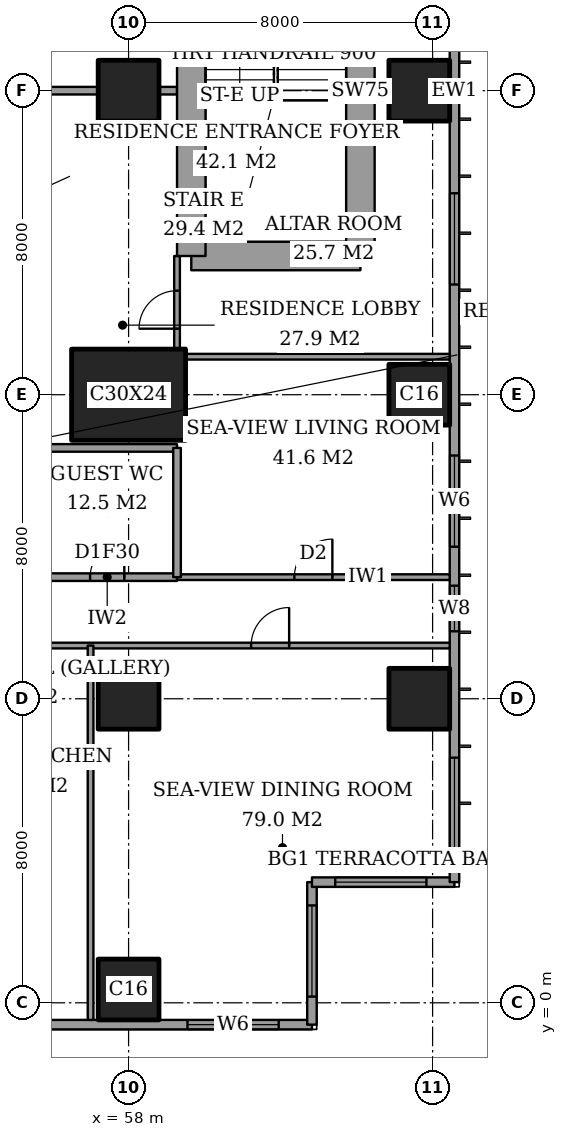
"""IFC4 building model, lengths in metres.
Left out: names, types, materials, properties, quantities, classifications, styles, units other than length and angle.
Written with IfcOpenShell. Run it as: python <this file> out.ifc"""

import sys

from ifc_helpers import new_model, si_unit, direction, frame, frame_2d, origin, origin_2d, place, context, subcontext, project, spatial, rectangle, extrude, element, fill, save


model = new_model("IFC4")
c1 = context("Model", 3, precision=1e-05, world=origin(), true_north=direction((0.0, 1.0)))
c2 = subcontext(c1, "Body", "Model", "MODEL_VIEW")
j1 = project(units=[si_unit("LENGTHUNIT", "METRE"), si_unit("PLANEANGLEUNIT", "RADIAN")], contexts=[c1])
p1 = place(None, origin())
s1 = spatial("IfcSite", under=j1, at=p1, CompositionType="ELEMENT")
p2 = place(p1, origin())
s2 = spatial("IfcBuilding", under=s1, at=p2, CompositionType="ELEMENT")
p3 = place(p2, frame((0.0, 0.0, 255.6)))
s3 = spatial("IfcBuildingStorey", under=s2, at=p3, CompositionType="ELEMENT", Elevation=255.6)
for number, where, z_axis, x_axis in (
    (1, (58.0, 0.35, 0.0), (0.0, 0.0, 1.0), (1.0, 0.0, 0.0)),
    (2, (58.0, 8.0, 0.0), (0.0, 0.0, 1.0), (1.0, 0.0, 0.0)),
):
    element("IfcColumn", number, at=place(p3, frame(where, z_axis=z_axis, x_axis=x_axis)), inside=s3, PredefinedType="COLUMN", context=c2, shape_type="SweptSolid", body=[
        extrude(rectangle(XDim=1.6, YDim=1.6, at=origin_2d()), origin(), (0.0, 0.0, 1.0), 3.6),
    ])
p4 = place(p3, frame((58.0, 16.0, 0.0), z_axis=(0.0, 0.0, 1.0), x_axis=(1.0, 0.0, 0.0)))
e3 = element("IfcColumn", 3, at=p4, inside=s3, PredefinedType="COLUMN", context=c2, shape_type="SweptSolid", body=[
    extrude(rectangle(XDim=3.0, YDim=2.4, at=origin_2d()), origin(), (0.0, 0.0, 1.0), 3.6),
])
for number, where, z_axis, x_axis in (
    (4, (58.0, 24.0, 0.0), (0.0, 0.0, 1.0), (1.0, 0.0, 0.0)),
    (5, (65.65, 8.0, 0.0), (0.0, 0.0, 1.0), (1.0, 0.0, 0.0)),
    (6, (65.65, 16.0, 0.0), (0.0, 0.0, 1.0), (1.0, 0.0, 0.0)),
    (7, (65.65, 24.0, 0.0), (0.0, 0.0, 1.0), (1.0, 0.0, 0.0)),
):
    element("IfcColumn", number, at=place(p3, frame(where, z_axis=z_axis, x_axis=x_axis)), inside=s3, PredefinedType="COLUMN", context=c2, shape_type="SweptSolid", body=[
        extrude(rectangle(XDim=1.6, YDim=1.6, at=origin_2d()), origin(), (0.0, 0.0, 1.0), 3.6),
    ])
p5 = place(p3, frame((59.65, 19.65, 0.0), z_axis=(0.0, 0.0, 1.0), x_axis=(1.0, 0.0, 0.0)))
e8 = element("IfcWall", 8, at=p5, inside=s3, PredefinedType="SHEAR", context=c2, shape_type="SweptSolid", body=[
    extrude(rectangle(XDim=4.45, YDim=0.75, at=frame_2d((2.225, 0.0))), origin(), (0.0, 0.0, 1.0), 3.6),
])
p6 = place(p3, frame((64.1, 19.65, 0.0), z_axis=(0.0, 0.0, 1.0), x_axis=(0.0, 1.0, 0.0)))
e9 = element("IfcWall", 9, at=p6, inside=s3, PredefinedType="SHEAR", context=c2, shape_type="SweptSolid", body=[
    extrude(rectangle(XDim=8.7, YDim=0.75, at=frame_2d((4.35, 0.0))), origin(), (0.0, 0.0, 1.0), 3.6),
])
p7 = place(p3, frame((59.65, 28.35, 0.0), z_axis=(0.0, 0.0, 1.0), x_axis=(0.0, -1.0, 0.0)))
e10 = element("IfcWall", 10, at=p7, inside=s3, PredefinedType="SHEAR", context=c2, shape_type="SweptSolid", body=[
    extrude(rectangle(XDim=8.7, YDim=0.75, at=frame_2d((4.35, 0.0))), origin(), (0.0, 0.0, 1.0), 3.6),
])
p8 = place(p7, frame((0.975, 0.0, 0.0)))
e11 = element("IfcOpeningElement", 11, at=p8, cuts=e10, PredefinedType="OPENING", context=c2, shape_type="SweptSolid", body=[
    extrude(rectangle(XDim=1.0, YDim=2.1, at=frame_2d((0.5, 1.05))), frame((0.0, 0.385, 0.0), z_axis=(0.0, -1.0, 0.0), x_axis=(1.0, 0.0, 0.0)), (0.0, 0.0, 1.0), 0.77),
])
p9 = place(p3, frame((41.425, -0.575, 0.0), z_axis=(0.0, 0.0, 1.0), x_axis=(1.0, 0.0, 0.0)))
e12 = element("IfcWall", 12, at=p9, inside=s3, PredefinedType="SOLIDWALL", context=c2, shape_type="SweptSolid", body=[
    extrude(rectangle(XDim=21.4, YDim=0.25, at=frame_2d((10.7, 0.0))), origin(), (0.0, 0.0, 1.0), 3.6),
])
p10 = place(p9, frame((3.65, 0.0, 0.6)))
e13 = element("IfcOpeningElement", 13, at=p10, cuts=e12, PredefinedType="OPENING", context=c2, shape_type="SweptSolid", body=[
    extrude(rectangle(XDim=2.4, YDim=2.0, at=frame_2d((1.2, 1.0))), frame((0.0, 0.135, 0.0), z_axis=(0.0, -1.0, 0.0), x_axis=(1.0, 0.0, 0.0)), (0.0, 0.0, 1.0), 0.27),
])
p11 = place(p9, frame((10.9, 0.0, 0.6)))
e14 = element("IfcOpeningElement", 14, at=p11, cuts=e12, PredefinedType="OPENING", context=c2, shape_type="SweptSolid", body=[
    extrude(rectangle(XDim=1.2, YDim=2.0, at=frame_2d((0.6, 1.0))), frame((0.0, 0.135, 0.0), z_axis=(0.0, -1.0, 0.0), x_axis=(1.0, 0.0, 0.0)), (0.0, 0.0, 1.0), 0.27),
])
p12 = place(p9, frame((13.325, 0.0, 0.6)))
e15 = element("IfcOpeningElement", 15, at=p12, cuts=e12, PredefinedType="OPENING", context=c2, shape_type="SweptSolid", body=[
    extrude(rectangle(XDim=1.2, YDim=2.0, at=frame_2d((0.6, 1.0))), frame((0.0, 0.135, 0.0), z_axis=(0.0, -1.0, 0.0), x_axis=(1.0, 0.0, 0.0)), (0.0, 0.0, 1.0), 0.27),
])
p13 = place(p9, frame((18.125, 0.0, 0.6)))
e16 = element("IfcOpeningElement", 16, at=p13, cuts=e12, PredefinedType="OPENING", context=c2, shape_type="SweptSolid", body=[
    extrude(rectangle(XDim=2.4, YDim=2.0, at=frame_2d((1.2, 1.0))), frame((0.0, 0.135, 0.0), z_axis=(0.0, -1.0, 0.0), x_axis=(1.0, 0.0, 0.0)), (0.0, 0.0, 1.0), 0.27),
])
p14 = place(p3, frame((62.825, -0.575, 0.0), z_axis=(0.0, 0.0, 1.0), x_axis=(0.0, 1.0, 0.0)))
e17 = element("IfcWall", 17, at=p14, inside=s3, PredefinedType="SOLIDWALL", context=c2, shape_type="SweptSolid", body=[
    extrude(rectangle(XDim=3.75, YDim=0.25, at=frame_2d((1.875, 0.0))), origin(), (0.0, 0.0, 1.0), 3.6),
])
p15 = place(p14, frame((0.738, 0.0, 0.6)))
e18 = element("IfcOpeningElement", 18, at=p15, cuts=e17, PredefinedType="OPENING", context=c2, shape_type="SweptSolid", body=[
    extrude(rectangle(XDim=2.4, YDim=2.0, at=frame_2d((1.2, 1.0))), frame((0.0, 0.135, 0.0), z_axis=(0.0, -1.0, 0.0), x_axis=(1.0, 0.0, 0.0)), (0.0, 0.0, 1.0), 0.27),
])
p16 = place(p3, frame((62.825, 3.175, 0.0), z_axis=(0.0, 0.0, 1.0), x_axis=(1.0, 0.0, 0.0)))
e19 = element("IfcWall", 19, at=p16, inside=s3, PredefinedType="SOLIDWALL", context=c2, shape_type="SweptSolid", body=[
    extrude(rectangle(XDim=3.75, YDim=0.25, at=frame_2d((1.875, 0.0))), origin(), (0.0, 0.0, 1.0), 3.6),
])
p17 = place(p16, frame((0.613, 0.0, 0.6)))
e20 = element("IfcOpeningElement", 20, at=p17, cuts=e19, PredefinedType="OPENING", context=c2, shape_type="SweptSolid", body=[
    extrude(rectangle(XDim=2.4, YDim=2.0, at=frame_2d((1.2, 1.0))), frame((0.0, 0.135, 0.0), z_axis=(0.0, -1.0, 0.0), x_axis=(1.0, 0.0, 0.0)), (0.0, 0.0, 1.0), 0.27),
])
p18 = place(p3, frame((66.575, 3.175, 0.0), z_axis=(0.0, 0.0, 1.0), x_axis=(0.0, 1.0, 0.0)))
e21 = element("IfcWall", 21, at=p18, inside=s3, PredefinedType="SOLIDWALL", context=c2, shape_type="SweptSolid", body=[
    extrude(rectangle(XDim=41.65, YDim=0.25, at=frame_2d((20.825, 0.0))), origin(), (0.0, 0.0, 1.0), 3.6),
])
p19 = place(p18, frame((0.875, 0.0, 0.6)))
e22 = element("IfcOpeningElement", 22, at=p19, cuts=e21, PredefinedType="OPENING", context=c2, shape_type="SweptSolid", body=[
    extrude(rectangle(XDim=2.4, YDim=2.0, at=frame_2d((1.2, 1.0))), frame((0.0, 0.135, 0.0), z_axis=(0.0, -1.0, 0.0), x_axis=(1.0, 0.0, 0.0)), (0.0, 0.0, 1.0), 0.27),
])
p20 = place(p18, frame((6.6, 0.0, 0.6)))
e23 = element("IfcOpeningElement", 23, at=p20, cuts=e21, PredefinedType="OPENING", context=c2, shape_type="SweptSolid", body=[
    extrude(rectangle(XDim=1.2, YDim=2.0, at=frame_2d((0.6, 1.0))), frame((0.0, 0.135, 0.0), z_axis=(0.0, -1.0, 0.0), x_axis=(1.0, 0.0, 0.0)), (0.0, 0.0, 1.0), 0.27),
])
p21 = place(p18, frame((8.825, 0.0, 0.6)))
e24 = element("IfcOpeningElement", 24, at=p21, cuts=e21, PredefinedType="OPENING", context=c2, shape_type="SweptSolid", body=[
    extrude(rectangle(XDim=2.4, YDim=2.0, at=frame_2d((1.2, 1.0))), frame((0.0, 0.135, 0.0), z_axis=(0.0, -1.0, 0.0), x_axis=(1.0, 0.0, 0.0)), (0.0, 0.0, 1.0), 0.27),
])
p22 = place(p18, frame((15.725, 0.0, 0.6)))
e25 = element("IfcOpeningElement", 25, at=p22, cuts=e21, PredefinedType="OPENING", context=c2, shape_type="SweptSolid", body=[
    extrude(rectangle(XDim=2.4, YDim=2.0, at=frame_2d((1.2, 1.0))), frame((0.0, 0.135, 0.0), z_axis=(0.0, -1.0, 0.0), x_axis=(1.0, 0.0, 0.0)), (0.0, 0.0, 1.0), 0.27),
])
p23 = place(p18, frame((23.625, 0.0, 0.6)))
e26 = element("IfcOpeningElement", 26, at=p23, cuts=e21, PredefinedType="OPENING", context=c2, shape_type="SweptSolid", body=[
    extrude(rectangle(XDim=2.4, YDim=2.0, at=frame_2d((1.2, 1.0))), frame((0.0, 0.135, 0.0), z_axis=(0.0, -1.0, 0.0), x_axis=(1.0, 0.0, 0.0)), (0.0, 0.0, 1.0), 0.27),
])
p24 = place(p18, frame((30.725, 0.0, 0.6)))
e27 = element("IfcOpeningElement", 27, at=p24, cuts=e21, PredefinedType="OPENING", context=c2, shape_type="SweptSolid", body=[
    extrude(rectangle(XDim=2.4, YDim=2.0, at=frame_2d((1.2, 1.0))), frame((0.0, 0.135, 0.0), z_axis=(0.0, -1.0, 0.0), x_axis=(1.0, 0.0, 0.0)), (0.0, 0.0, 1.0), 0.27),
])
p25 = place(p18, frame((34.525, 0.0, 0.6)))
e28 = element("IfcOpeningElement", 28, at=p25, cuts=e21, PredefinedType="OPENING", context=c2, shape_type="SweptSolid", body=[
    extrude(rectangle(XDim=1.2, YDim=2.0, at=frame_2d((0.6, 1.0))), frame((0.0, 0.135, 0.0), z_axis=(0.0, -1.0, 0.0), x_axis=(1.0, 0.0, 0.0)), (0.0, 0.0, 1.0), 0.27),
])
p26 = place(p18, frame((38.375, 0.0, 0.6)))
e29 = element("IfcOpeningElement", 29, at=p26, cuts=e21, PredefinedType="OPENING", context=c2, shape_type="SweptSolid", body=[
    extrude(rectangle(XDim=2.4, YDim=2.0, at=frame_2d((1.2, 1.0))), frame((0.0, 0.135, 0.0), z_axis=(0.0, -1.0, 0.0), x_axis=(1.0, 0.0, 0.0)), (0.0, 0.0, 1.0), 0.27),
])
p27 = place(p3, frame((41.439, 9.4, 0.0), z_axis=(0.0, 0.0, 1.0), x_axis=(1.0, 0.0, 0.0)))
e30 = element("IfcWall", 30, at=p27, inside=s3, PredefinedType="PARTITIONING", context=c2, shape_type="SweptSolid", body=[
    extrude(rectangle(XDim=25.011, YDim=0.15, at=frame_2d((12.505, 0.0))), origin(), (0.0, 0.0, 1.0), 3.35),
])
p28 = place(p27, frame((19.786, 0.0, 0.0)))
e31 = element("IfcOpeningElement", 31, at=p28, cuts=e30, PredefinedType="OPENING", context=c2, shape_type="SweptSolid", body=[
    extrude(rectangle(XDim=1.0, YDim=2.1, at=frame_2d((0.5, 1.05))), frame((0.0, 0.085, 0.0), z_axis=(0.0, -1.0, 0.0), x_axis=(1.0, 0.0, 0.0)), (0.0, 0.0, 1.0), 0.17),
])
p29 = place(p27, frame((13.411, 0.0, 0.0)))
e32 = element("IfcOpeningElement", 32, at=p29, cuts=e30, PredefinedType="OPENING", context=c2, shape_type="SweptSolid", body=[
    extrude(rectangle(XDim=1.0, YDim=2.1, at=frame_2d((0.5, 1.05))), frame((0.0, 0.085, 0.0), z_axis=(0.0, -1.0, 0.0), x_axis=(1.0, 0.0, 0.0)), (0.0, 0.0, 1.0), 0.17),
])
p30 = place(p27, frame((5.661, 0.0, 0.0)))
e33 = element("IfcOpeningElement", 33, at=p30, cuts=e30, PredefinedType="OPENING", context=c2, shape_type="SweptSolid", body=[
    extrude(rectangle(XDim=1.0, YDim=2.1, at=frame_2d((0.5, 1.05))), frame((0.0, 0.085, 0.0), z_axis=(0.0, -1.0, 0.0), x_axis=(1.0, 0.0, 0.0)), (0.0, 0.0, 1.0), 0.17),
])
p31 = place(p3, frame((55.6, 11.2, 0.0), z_axis=(0.0, 0.0, 1.0), x_axis=(1.0, 0.0, 0.0)))
e34 = element("IfcWall", 34, at=p31, inside=s3, PredefinedType="PARTITIONING", context=c2, shape_type="SweptSolid", body=[
    extrude(rectangle(XDim=3.675, YDim=0.2, at=frame_2d((1.837, 0.0))), origin(), (0.0, 0.0, 1.0), 3.35),
])
p32 = place(p31, frame((1.387, 0.0, 0.0)))
e35 = element("IfcOpeningElement", 35, at=p32, cuts=e34, PredefinedType="OPENING", context=c2, shape_type="SweptSolid", body=[
    extrude(rectangle(XDim=0.9, YDim=2.1, at=frame_2d((0.45, 1.05))), frame((0.0, 0.11, 0.0), z_axis=(0.0, -1.0, 0.0), x_axis=(1.0, 0.0, 0.0)), (0.0, 0.0, 1.0), 0.22),
])
p33 = place(p3, frame((59.275, 11.2, 0.0), z_axis=(0.0, 0.0, 1.0), x_axis=(1.0, 0.0, 0.0)))
e36 = element("IfcWall", 36, at=p33, inside=s3, PredefinedType="PARTITIONING", context=c2, shape_type="SweptSolid", body=[
    extrude(rectangle(XDim=7.175, YDim=0.15, at=frame_2d((3.587, 0.0))), origin(), (0.0, 0.0, 1.0), 3.35),
])
p34 = place(p33, frame((3.087, 0.0, 0.0)))
e37 = element("IfcOpeningElement", 37, at=p34, cuts=e36, PredefinedType="OPENING", context=c2, shape_type="SweptSolid", body=[
    extrude(rectangle(XDim=1.0, YDim=2.1, at=frame_2d((0.5, 1.05))), frame((0.0, 0.085, 0.0), z_axis=(0.0, -1.0, 0.0), x_axis=(1.0, 0.0, 0.0)), (0.0, 0.0, 1.0), 0.17),
])
p35 = place(p3, frame((55.6, 14.6, 0.0), z_axis=(0.0, 0.0, 1.0), x_axis=(1.0, 0.0, 0.0)))
e38 = element("IfcWall", 38, at=p35, inside=s3, PredefinedType="PARTITIONING", context=c2, shape_type="SweptSolid", body=[
    extrude(rectangle(XDim=3.675, YDim=0.2, at=frame_2d((1.837, 0.0))), origin(), (0.0, 0.0, 1.0), 3.35),
])
p36 = place(p3, frame((59.5, 17.0, 0.0), z_axis=(0.0, 0.0, 1.0), x_axis=(1.0, 0.0, 0.0)))
e39 = element("IfcWall", 39, at=p36, inside=s3, PredefinedType="PARTITIONING", context=c2, shape_type="SweptSolid", body=[
    extrude(rectangle(XDim=6.95, YDim=0.15, at=frame_2d((3.475, 0.0))), origin(), (0.0, 0.0, 1.0), 3.35),
])
p37 = place(p3, frame((50.8, 24.0, 0.0), z_axis=(0.0, 0.0, 1.0), x_axis=(1.0, 0.0, 0.0)))
e40 = element("IfcWall", 40, at=p37, inside=s3, PredefinedType="PARTITIONING", context=c2, shape_type="SweptSolid", body=[
    extrude(rectangle(XDim=6.4, YDim=0.2, at=frame_2d((3.2, 0.0))), origin(), (0.0, 0.0, 1.0), 3.35),
])
p38 = place(p3, frame((58.8, 24.0, 0.0), z_axis=(0.0, 0.0, 1.0), x_axis=(1.0, 0.0, 0.0)))
e41 = element("IfcWall", 41, at=p38, inside=s3, PredefinedType="PARTITIONING", context=c2, shape_type="SweptSolid", body=[
    extrude(rectangle(XDim=0.475, YDim=0.2, at=frame_2d((0.237, 0.0))), origin(), (0.0, 0.0, 1.0), 3.35),
])
p39 = place(p3, frame((64.475, 24.0, 0.0), z_axis=(0.0, 0.0, 1.0), x_axis=(1.0, 0.0, 0.0)))
e42 = element("IfcWall", 42, at=p39, inside=s3, PredefinedType="PARTITIONING", context=c2, shape_type="SweptSolid", body=[
    extrude(rectangle(XDim=0.375, YDim=0.15, at=frame_2d((0.188, 0.0))), origin(), (0.0, 0.0, 1.0), 3.35),
])
p40 = place(p3, frame((57.0, -0.45, 0.0), z_axis=(0.0, 0.0, 1.0), x_axis=(0.0, 1.0, 0.0)))
e43 = element("IfcWall", 43, at=p40, inside=s3, PredefinedType="PARTITIONING", context=c2, shape_type="SweptSolid", body=[
    extrude(rectangle(XDim=9.85, YDim=0.15, at=frame_2d((4.925, 0.0))), origin(), (0.0, 0.0, 1.0), 3.35),
])
p41 = place(p3, frame((59.275, 11.2, 0.0), z_axis=(0.0, 0.0, 1.0), x_axis=(0.0, 1.0, 0.0)))
e44 = element("IfcWall", 44, at=p41, inside=s3, PredefinedType="PARTITIONING", context=c2, shape_type="SweptSolid", body=[
    extrude(rectangle(XDim=3.4, YDim=0.2, at=frame_2d((1.7, 0.0))), origin(), (0.0, 0.0, 1.0), 3.35),
])
p42 = place(p3, frame((59.275, 17.2, 0.0), z_axis=(0.0, 0.0, 1.0), x_axis=(0.0, 1.0, 0.0)))
e45 = element("IfcWall", 45, at=p42, inside=s3, PredefinedType="PARTITIONING", context=c2, shape_type="SweptSolid", body=[
    extrude(rectangle(XDim=2.45, YDim=0.15, at=frame_2d((1.225, 0.0))), origin(), (0.0, 0.0, 1.0), 3.35),
])
p43 = place(p42, frame((0.538, 0.0, 0.0)))
e46 = element("IfcOpeningElement", 46, at=p43, cuts=e45, PredefinedType="OPENING", context=c2, shape_type="SweptSolid", body=[
    extrude(rectangle(XDim=1.0, YDim=2.1, at=frame_2d((0.5, 1.05))), frame((0.0, 0.085, 0.0), z_axis=(0.0, -1.0, 0.0), x_axis=(1.0, 0.0, 0.0)), (0.0, 0.0, 1.0), 0.17),
])
p44 = place(p13, origin())
e47 = element("IfcWindow", 47, at=p44, inside=s3, PartitioningType="SINGLE_PANEL", PredefinedType="WINDOW", context=c2, shape_type="SweptSolid", body=[
    extrude(rectangle(XDim=2.4, YDim=2.0, at=frame_2d((1.2, 1.0))), frame((0.0, 0.03, 0.0), z_axis=(0.0, -1.0, 0.0), x_axis=(1.0, 0.0, 0.0)), (0.0, 0.0, 1.0), 0.06),
])
fill(e16, e47)
p45 = place(p15, origin())
e48 = element("IfcWindow", 48, at=p45, inside=s3, PartitioningType="SINGLE_PANEL", PredefinedType="WINDOW", context=c2, shape_type="SweptSolid", body=[
    extrude(rectangle(XDim=2.4, YDim=2.0, at=frame_2d((1.2, 1.0))), frame((0.0, 0.03, 0.0), z_axis=(0.0, -1.0, 0.0), x_axis=(1.0, 0.0, 0.0)), (0.0, 0.0, 1.0), 0.06),
])
fill(e18, e48)
p46 = place(p17, origin())
e49 = element("IfcWindow", 49, at=p46, inside=s3, PartitioningType="SINGLE_PANEL", PredefinedType="WINDOW", context=c2, shape_type="SweptSolid", body=[
    extrude(rectangle(XDim=2.4, YDim=2.0, at=frame_2d((1.2, 1.0))), frame((0.0, 0.03, 0.0), z_axis=(0.0, -1.0, 0.0), x_axis=(1.0, 0.0, 0.0)), (0.0, 0.0, 1.0), 0.06),
])
fill(e20, e49)
p47 = place(p19, origin())
e50 = element("IfcWindow", 50, at=p47, inside=s3, PartitioningType="SINGLE_PANEL", PredefinedType="WINDOW", context=c2, shape_type="SweptSolid", body=[
    extrude(rectangle(XDim=2.4, YDim=2.0, at=frame_2d((1.2, 1.0))), frame((0.0, 0.03, 0.0), z_axis=(0.0, -1.0, 0.0), x_axis=(1.0, 0.0, 0.0)), (0.0, 0.0, 1.0), 0.06),
])
fill(e22, e50)
p48 = place(p20, origin())
e51 = element("IfcWindow", 51, at=p48, inside=s3, PartitioningType="SINGLE_PANEL", PredefinedType="WINDOW", context=c2, shape_type="SweptSolid", body=[
    extrude(rectangle(XDim=1.2, YDim=2.0, at=frame_2d((0.6, 1.0))), frame((0.0, 0.03, 0.0), z_axis=(0.0, -1.0, 0.0), x_axis=(1.0, 0.0, 0.0)), (0.0, 0.0, 1.0), 0.06),
])
fill(e23, e51)
p49 = place(p21, origin())
e52 = element("IfcWindow", 52, at=p49, inside=s3, PartitioningType="SINGLE_PANEL", PredefinedType="WINDOW", context=c2, shape_type="SweptSolid", body=[
    extrude(rectangle(XDim=2.4, YDim=2.0, at=frame_2d((1.2, 1.0))), frame((0.0, 0.03, 0.0), z_axis=(0.0, -1.0, 0.0), x_axis=(1.0, 0.0, 0.0)), (0.0, 0.0, 1.0), 0.06),
])
fill(e24, e52)
p50 = place(p22, origin())
e53 = element("IfcWindow", 53, at=p50, inside=s3, PartitioningType="SINGLE_PANEL", PredefinedType="WINDOW", context=c2, shape_type="SweptSolid", body=[
    extrude(rectangle(XDim=2.4, YDim=2.0, at=frame_2d((1.2, 1.0))), frame((0.0, 0.03, 0.0), z_axis=(0.0, -1.0, 0.0), x_axis=(1.0, 0.0, 0.0)), (0.0, 0.0, 1.0), 0.06),
])
fill(e25, e53)
p51 = place(p28, origin())
e54 = element("IfcDoor", 54, at=p51, inside=s3, OperationType="SINGLE_SWING_LEFT", PredefinedType="DOOR", context=c2, shape_type="SweptSolid", body=[
    extrude(rectangle(XDim=1.0, YDim=2.1, at=frame_2d((0.5, 1.05))), frame((0.0, 0.025, 0.0), z_axis=(0.0, -1.0, 0.0), x_axis=(1.0, 0.0, 0.0)), (0.0, 0.0, 1.0), 0.05),
])
fill(e31, e54)
p52 = place(p34, origin())
e55 = element("IfcDoor", 55, at=p52, inside=s3, OperationType="SINGLE_SWING_LEFT", PredefinedType="DOOR", context=c2, shape_type="SweptSolid", body=[
    extrude(rectangle(XDim=1.0, YDim=2.1, at=frame_2d((0.5, 1.05))), frame((0.0, 0.025, 0.0), z_axis=(0.0, -1.0, 0.0), x_axis=(1.0, 0.0, 0.0)), (0.0, 0.0, 1.0), 0.05),
])
fill(e37, e55)
p53 = place(p43, origin())
e56 = element("IfcDoor", 56, at=p53, inside=s3, OperationType="SINGLE_SWING_RIGHT", PredefinedType="DOOR", context=c2, shape_type="SweptSolid", body=[
    extrude(rectangle(XDim=1.0, YDim=2.1, at=frame_2d((0.5, 1.05))), frame((0.0, 0.025, 0.0), z_axis=(0.0, -1.0, 0.0), x_axis=(1.0, 0.0, 0.0)), (0.0, 0.0, 1.0), 0.05),
])
fill(e46, e56)
p54 = place(p32, origin())
e57 = element("IfcDoor", 57, at=p54, inside=s3, OperationType="SINGLE_SWING_LEFT", PredefinedType="DOOR", context=c2, shape_type="SweptSolid", body=[
    extrude(rectangle(XDim=0.9, YDim=2.1, at=frame_2d((0.45, 1.05))), frame((0.0, 0.025, 0.0), z_axis=(0.0, -1.0, 0.0), x_axis=(1.0, 0.0, 0.0)), (0.0, 0.0, 1.0), 0.05),
])
fill(e35, e57)
save(model, sys.argv[1])
